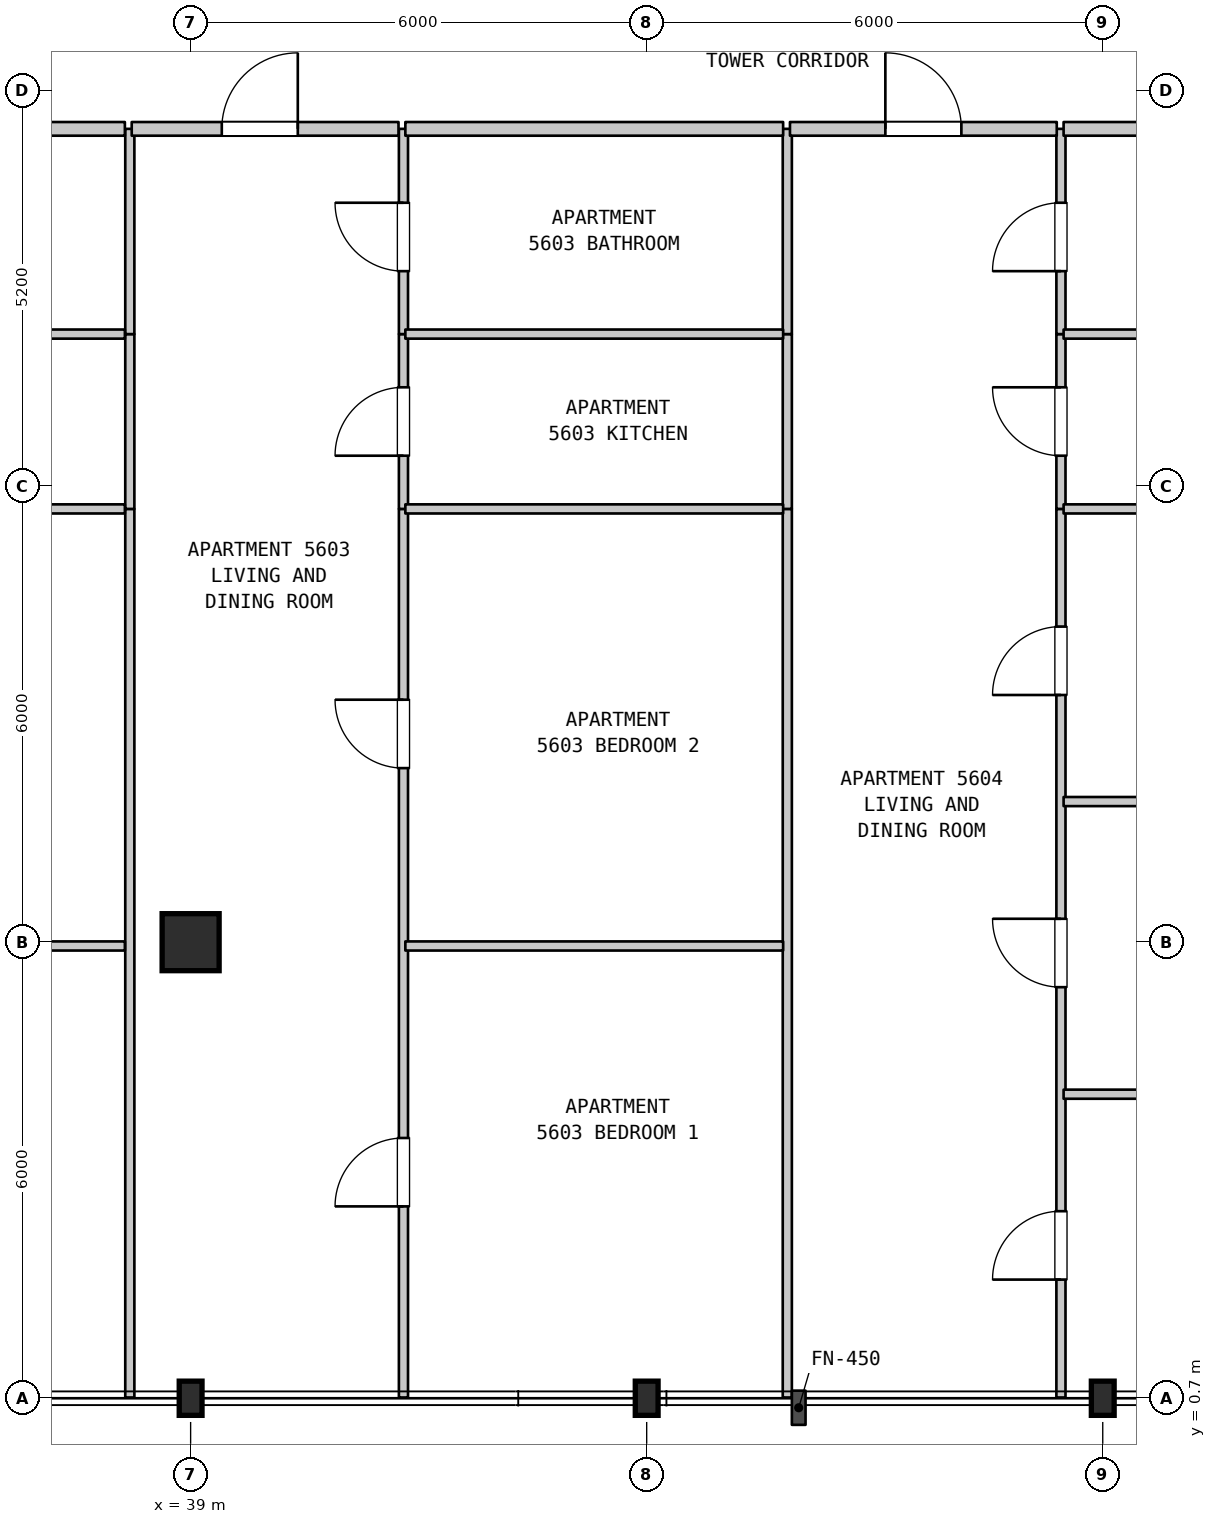
"""IFC4 building model, lengths in metres.
Left out: names, types, materials, properties, quantities, classifications, styles, units other than length and angle.
Written with IfcOpenShell. Run it as: python <this file> out.ifc"""

import sys

from ifc_helpers import new_model, si_unit, direction, frame, frame_2d, origin, origin_2d, place, context, subcontext, project, spatial, rectangle, i_section, extrude, element, fill, save


model = new_model("IFC4")
c1 = context("Model", 3, precision=1e-05, world=origin(), true_north=direction((0.0, 1.0)))
c2 = subcontext(c1, "Body", "Model", "MODEL_VIEW")
j1 = project(units=[si_unit("LENGTHUNIT", "METRE"), si_unit("PLANEANGLEUNIT", "RADIAN")], contexts=[c1])
p1 = place(None, origin())
s1 = spatial("IfcSite", under=j1, at=p1, CompositionType="ELEMENT")
p2 = place(p1, origin())
s2 = spatial("IfcBuilding", under=s1, at=p2, CompositionType="ELEMENT")
p3 = place(p2, frame((0.0, 0.0, 226.5)))
s3 = spatial("IfcBuildingStorey", under=s2, at=p3, CompositionType="ELEMENT", Elevation=226.5)
p4 = place(p3, frame((39.0, 0.7, 0.0), z_axis=(0.0, 0.0, 1.0), x_axis=(1.0, 0.0, 0.0)))
e1 = element("IfcColumn", 1, at=p4, inside=s3, PredefinedType="COLUMN", context=c2, shape_type="SweptSolid", body=[
    extrude(i_section(OverallWidth=0.3, OverallDepth=0.45, WebThickness=0.014, FlangeThickness=0.026, FilletRadius=0.027, at=origin_2d()), origin(), (0.0, 0.0, 1.0), 3.7),
])
p5 = place(p3, frame((39.0, 6.7, 0.0), z_axis=(0.0, 0.0, 1.0), x_axis=(1.0, 0.0, 0.0)))
e2 = element("IfcColumn", 2, at=p5, inside=s3, PredefinedType="COLUMN", context=c2, shape_type="SweptSolid", body=[
    extrude(rectangle(XDim=0.75, YDim=0.75, at=origin_2d()), origin(), (0.0, 0.0, 1.0), 3.7),
])
for number, where, z_axis, x_axis in (
    (3, (45.0, 0.7, 0.0), (0.0, 0.0, 1.0), (1.0, 0.0, 0.0)),
    (4, (51.0, 0.7, 0.0), (0.0, 0.0, 1.0), (1.0, 0.0, 0.0)),
):
    element("IfcColumn", number, at=place(p3, frame(where, z_axis=z_axis, x_axis=x_axis)), inside=s3, PredefinedType="COLUMN", context=c2, shape_type="SweptSolid", body=[
        extrude(i_section(OverallWidth=0.3, OverallDepth=0.45, WebThickness=0.014, FlangeThickness=0.026, FilletRadius=0.027, at=origin_2d()), origin(), (0.0, 0.0, 1.0), 3.7),
    ])
p6 = place(p3, frame((38.2, 0.71, 0.0), z_axis=(0.0, 0.0, 1.0), x_axis=(0.0, 1.0, 0.0)))
e5 = element("IfcWall", 5, at=p6, inside=s3, PredefinedType="PARTITIONING", context=c2, shape_type="SweptSolid", body=[
    extrude(rectangle(XDim=11.69, YDim=0.12, at=frame_2d((5.845, 0.0))), origin(), (0.0, 0.0, 1.0), 3.39),
])
p7 = place(p3, frame((38.2, 12.4, 0.0), z_axis=(0.0, 0.0, 1.0), x_axis=(0.0, 1.0, 0.0)))
e6 = element("IfcWall", 6, at=p7, inside=s3, PredefinedType="PARTITIONING", context=c2, shape_type="SweptSolid", body=[
    extrude(rectangle(XDim=2.3, YDim=0.12, at=frame_2d((1.15, 0.0))), origin(), (0.0, 0.0, 1.0), 3.39),
])
p8 = place(p3, frame((38.2, 14.7, 0.0), z_axis=(0.0, 0.0, 1.0), x_axis=(0.0, 1.0, 0.0)))
e7 = element("IfcWall", 7, at=p8, inside=s3, PredefinedType="PARTITIONING", context=c2, shape_type="SweptSolid", body=[
    extrude(rectangle(XDim=2.7, YDim=0.12, at=frame_2d((1.35, 0.0))), origin(), (0.0, 0.0, 1.0), 3.39),
])
p9 = place(p3, frame((41.8, 0.71, 0.0), z_axis=(0.0, 0.0, 1.0), x_axis=(0.0, 1.0, 0.0)))
e8 = element("IfcWall", 8, at=p9, inside=s3, PredefinedType="PARTITIONING", context=c2, shape_type="SweptSolid", body=[
    extrude(rectangle(XDim=11.69, YDim=0.12, at=frame_2d((5.845, 0.0))), origin(), (0.0, 0.0, 1.0), 3.39),
])
p10 = place(p9, frame((2.514, 0.0, 0.0)))
e9 = element("IfcOpeningElement", 9, at=p10, cuts=e8, PredefinedType="OPENING", context=c2, shape_type="SweptSolid", body=[
    extrude(rectangle(XDim=0.9, YDim=2.15, at=frame_2d((0.45, 1.075))), frame((0.0, 0.07, 0.0), z_axis=(0.0, -1.0, 0.0), x_axis=(1.0, 0.0, 0.0)), (0.0, 0.0, 1.0), 0.14),
])
p11 = place(p9, frame((8.28, 0.0, 0.0)))
e10 = element("IfcOpeningElement", 10, at=p11, cuts=e8, PredefinedType="OPENING", context=c2, shape_type="SweptSolid", body=[
    extrude(rectangle(XDim=0.9, YDim=2.15, at=frame_2d((0.45, 1.075))), frame((0.0, 0.07, 0.0), z_axis=(0.0, -1.0, 0.0), x_axis=(1.0, 0.0, 0.0)), (0.0, 0.0, 1.0), 0.14),
])
p12 = place(p3, frame((41.8, 12.4, 0.0), z_axis=(0.0, 0.0, 1.0), x_axis=(0.0, 1.0, 0.0)))
e11 = element("IfcWall", 11, at=p12, inside=s3, PredefinedType="PARTITIONING", context=c2, shape_type="SweptSolid", body=[
    extrude(rectangle(XDim=2.3, YDim=0.12, at=frame_2d((1.15, 0.0))), origin(), (0.0, 0.0, 1.0), 3.39),
])
p13 = place(p12, frame((0.7, 0.0, 0.0)))
e12 = element("IfcOpeningElement", 12, at=p13, cuts=e11, PredefinedType="OPENING", context=c2, shape_type="SweptSolid", body=[
    extrude(rectangle(XDim=0.9, YDim=2.15, at=frame_2d((0.45, 1.075))), frame((0.0, 0.07, 0.0), z_axis=(0.0, -1.0, 0.0), x_axis=(1.0, 0.0, 0.0)), (0.0, 0.0, 1.0), 0.14),
])
p14 = place(p3, frame((41.8, 14.7, 0.0), z_axis=(0.0, 0.0, 1.0), x_axis=(0.0, 1.0, 0.0)))
e13 = element("IfcWall", 13, at=p14, inside=s3, PredefinedType="PARTITIONING", context=c2, shape_type="SweptSolid", body=[
    extrude(rectangle(XDim=2.7, YDim=0.12, at=frame_2d((1.35, 0.0))), origin(), (0.0, 0.0, 1.0), 3.39),
])
p15 = place(p14, frame((0.828, 0.0, 0.0)))
e14 = element("IfcOpeningElement", 14, at=p15, cuts=e13, PredefinedType="OPENING", context=c2, shape_type="SweptSolid", body=[
    extrude(rectangle(XDim=0.9, YDim=2.1, at=frame_2d((0.45, 1.05))), frame((0.0, 0.07, 0.0), z_axis=(0.0, -1.0, 0.0), x_axis=(1.0, 0.0, 0.0)), (0.0, 0.0, 1.0), 0.14),
])
p16 = place(p3, frame((46.85, 0.71, 0.0), z_axis=(0.0, 0.0, 1.0), x_axis=(0.0, 1.0, 0.0)))
e15 = element("IfcWall", 15, at=p16, inside=s3, PredefinedType="PARTITIONING", context=c2, shape_type="SweptSolid", body=[
    extrude(rectangle(XDim=11.69, YDim=0.12, at=frame_2d((5.845, 0.0))), origin(), (0.0, 0.0, 1.0), 3.39),
])
p17 = place(p3, frame((46.85, 12.4, 0.0), z_axis=(0.0, 0.0, 1.0), x_axis=(0.0, 1.0, 0.0)))
e16 = element("IfcWall", 16, at=p17, inside=s3, PredefinedType="PARTITIONING", context=c2, shape_type="SweptSolid", body=[
    extrude(rectangle(XDim=2.3, YDim=0.12, at=frame_2d((1.15, 0.0))), origin(), (0.0, 0.0, 1.0), 3.39),
])
p18 = place(p3, frame((46.85, 14.7, 0.0), z_axis=(0.0, 0.0, 1.0), x_axis=(0.0, 1.0, 0.0)))
e17 = element("IfcWall", 17, at=p18, inside=s3, PredefinedType="PARTITIONING", context=c2, shape_type="SweptSolid", body=[
    extrude(rectangle(XDim=2.7, YDim=0.12, at=frame_2d((1.35, 0.0))), origin(), (0.0, 0.0, 1.0), 3.39),
])
p19 = place(p3, frame((50.45, 0.71, 0.0), z_axis=(0.0, 0.0, 1.0), x_axis=(0.0, 1.0, 0.0)))
e18 = element("IfcWall", 18, at=p19, inside=s3, PredefinedType="PARTITIONING", context=c2, shape_type="SweptSolid", body=[
    extrude(rectangle(XDim=11.69, YDim=0.12, at=frame_2d((5.845, 0.0))), origin(), (0.0, 0.0, 1.0), 3.39),
])
p20 = place(p19, frame((1.551, 0.0, 0.0)))
e19 = element("IfcOpeningElement", 19, at=p20, cuts=e18, PredefinedType="OPENING", context=c2, shape_type="SweptSolid", body=[
    extrude(rectangle(XDim=0.9, YDim=2.15, at=frame_2d((0.45, 1.075))), frame((0.0, 0.07, 0.0), z_axis=(0.0, -1.0, 0.0), x_axis=(1.0, 0.0, 0.0)), (0.0, 0.0, 1.0), 0.14),
])
p21 = place(p19, frame((5.398, 0.0, 0.0)))
e20 = element("IfcOpeningElement", 20, at=p21, cuts=e18, PredefinedType="OPENING", context=c2, shape_type="SweptSolid", body=[
    extrude(rectangle(XDim=0.9, YDim=2.15, at=frame_2d((0.45, 1.075))), frame((0.0, 0.07, 0.0), z_axis=(0.0, -1.0, 0.0), x_axis=(1.0, 0.0, 0.0)), (0.0, 0.0, 1.0), 0.14),
])
p22 = place(p19, frame((9.242, 0.0, 0.0)))
e21 = element("IfcOpeningElement", 21, at=p22, cuts=e18, PredefinedType="OPENING", context=c2, shape_type="SweptSolid", body=[
    extrude(rectangle(XDim=0.9, YDim=2.15, at=frame_2d((0.45, 1.075))), frame((0.0, 0.07, 0.0), z_axis=(0.0, -1.0, 0.0), x_axis=(1.0, 0.0, 0.0)), (0.0, 0.0, 1.0), 0.14),
])
p23 = place(p3, frame((50.45, 12.4, 0.0), z_axis=(0.0, 0.0, 1.0), x_axis=(0.0, 1.0, 0.0)))
e22 = element("IfcWall", 22, at=p23, inside=s3, PredefinedType="PARTITIONING", context=c2, shape_type="SweptSolid", body=[
    extrude(rectangle(XDim=2.3, YDim=0.12, at=frame_2d((1.15, 0.0))), origin(), (0.0, 0.0, 1.0), 3.39),
])
p24 = place(p23, frame((0.7, 0.0, 0.0)))
e23 = element("IfcOpeningElement", 23, at=p24, cuts=e22, PredefinedType="OPENING", context=c2, shape_type="SweptSolid", body=[
    extrude(rectangle(XDim=0.9, YDim=2.15, at=frame_2d((0.45, 1.075))), frame((0.0, 0.07, 0.0), z_axis=(0.0, -1.0, 0.0), x_axis=(1.0, 0.0, 0.0)), (0.0, 0.0, 1.0), 0.14),
])
p25 = place(p3, frame((50.45, 14.7, 0.0), z_axis=(0.0, 0.0, 1.0), x_axis=(0.0, 1.0, 0.0)))
e24 = element("IfcWall", 24, at=p25, inside=s3, PredefinedType="PARTITIONING", context=c2, shape_type="SweptSolid", body=[
    extrude(rectangle(XDim=2.7, YDim=0.12, at=frame_2d((1.35, 0.0))), origin(), (0.0, 0.0, 1.0), 3.39),
])
p26 = place(p25, frame((0.828, 0.0, 0.0)))
e25 = element("IfcOpeningElement", 25, at=p26, cuts=e24, PredefinedType="OPENING", context=c2, shape_type="SweptSolid", body=[
    extrude(rectangle(XDim=0.9, YDim=2.1, at=frame_2d((0.45, 1.05))), frame((0.0, 0.07, 0.0), z_axis=(0.0, -1.0, 0.0), x_axis=(1.0, 0.0, 0.0)), (0.0, 0.0, 1.0), 0.14),
])
p27 = place(p3, frame((50.485, 4.7, 0.0), z_axis=(0.0, 0.0, 1.0), x_axis=(1.0, 0.0, 0.0)))
e26 = element("IfcWall", 26, at=p27, inside=s3, PredefinedType="PARTITIONING", context=c2, shape_type="SweptSolid", body=[
    extrude(rectangle(XDim=6.505, YDim=0.12, at=frame_2d((3.252, 0.0))), origin(), (0.0, 0.0, 1.0), 3.39),
])
p28 = place(p3, frame((33.445, 6.65, 0.0), z_axis=(0.0, 0.0, 1.0), x_axis=(1.0, 0.0, 0.0)))
e27 = element("IfcWall", 27, at=p28, inside=s3, PredefinedType="PARTITIONING", context=c2, shape_type="SweptSolid", body=[
    extrude(rectangle(XDim=4.69, YDim=0.12, at=frame_2d((2.345, 0.0))), origin(), (0.0, 0.0, 1.0), 3.09),
])
p29 = place(p3, frame((41.825, 6.65, 0.0), z_axis=(0.0, 0.0, 1.0), x_axis=(1.0, 0.0, 0.0)))
e28 = element("IfcWall", 28, at=p29, inside=s3, PredefinedType="PARTITIONING", context=c2, shape_type="SweptSolid", body=[
    extrude(rectangle(XDim=4.97, YDim=0.12, at=frame_2d((2.485, 0.0))), origin(), (0.0, 0.0, 1.0), 2.79),
])
p30 = place(p3, frame((50.485, 8.55, 0.0), z_axis=(0.0, 0.0, 1.0), x_axis=(1.0, 0.0, 0.0)))
e29 = element("IfcWall", 29, at=p30, inside=s3, PredefinedType="PARTITIONING", context=c2, shape_type="SweptSolid", body=[
    extrude(rectangle(XDim=6.505, YDim=0.12, at=frame_2d((3.252, 0.0))), origin(), (0.0, 0.0, 1.0), 3.39),
])
p31 = place(p3, frame((33.445, 12.4, 0.0), z_axis=(0.0, 0.0, 1.0), x_axis=(1.0, 0.0, 0.0)))
e30 = element("IfcWall", 30, at=p31, inside=s3, PredefinedType="PARTITIONING", context=c2, shape_type="SweptSolid", body=[
    extrude(rectangle(XDim=4.69, YDim=0.12, at=frame_2d((2.345, 0.0))), origin(), (0.0, 0.0, 1.0), 3.39),
])
p32 = place(p3, frame((41.825, 12.4, 0.0), z_axis=(0.0, 0.0, 1.0), x_axis=(1.0, 0.0, 0.0)))
e31 = element("IfcWall", 31, at=p32, inside=s3, PredefinedType="PARTITIONING", context=c2, shape_type="SweptSolid", body=[
    extrude(rectangle(XDim=4.97, YDim=0.12, at=frame_2d((2.485, 0.0))), origin(), (0.0, 0.0, 1.0), 3.39),
])
p33 = place(p3, frame((50.485, 12.4, 0.0), z_axis=(0.0, 0.0, 1.0), x_axis=(1.0, 0.0, 0.0)))
e32 = element("IfcWall", 32, at=p33, inside=s3, PredefinedType="PARTITIONING", context=c2, shape_type="SweptSolid", body=[
    extrude(rectangle(XDim=6.505, YDim=0.12, at=frame_2d((3.252, 0.0))), origin(), (0.0, 0.0, 1.0), 3.39),
])
p34 = place(p3, frame((33.445, 14.7, 0.0), z_axis=(0.0, 0.0, 1.0), x_axis=(1.0, 0.0, 0.0)))
e33 = element("IfcWall", 33, at=p34, inside=s3, PredefinedType="PARTITIONING", context=c2, shape_type="SweptSolid", body=[
    extrude(rectangle(XDim=4.69, YDim=0.12, at=frame_2d((2.345, 0.0))), origin(), (0.0, 0.0, 1.0), 3.39),
])
p35 = place(p3, frame((41.825, 14.7, 0.0), z_axis=(0.0, 0.0, 1.0), x_axis=(1.0, 0.0, 0.0)))
e34 = element("IfcWall", 34, at=p35, inside=s3, PredefinedType="PARTITIONING", context=c2, shape_type="SweptSolid", body=[
    extrude(rectangle(XDim=4.97, YDim=0.12, at=frame_2d((2.485, 0.0))), origin(), (0.0, 0.0, 1.0), 3.39),
])
p36 = place(p3, frame((50.485, 14.7, 0.0), z_axis=(0.0, 0.0, 1.0), x_axis=(1.0, 0.0, 0.0)))
e35 = element("IfcWall", 35, at=p36, inside=s3, PredefinedType="PARTITIONING", context=c2, shape_type="SweptSolid", body=[
    extrude(rectangle(XDim=6.505, YDim=0.12, at=frame_2d((3.252, 0.0))), origin(), (0.0, 0.0, 1.0), 3.39),
])
p37 = place(p3, frame((33.445, 17.4, 0.0), z_axis=(0.0, 0.0, 1.0), x_axis=(1.0, 0.0, 0.0)))
e36 = element("IfcWall", 36, at=p37, inside=s3, PredefinedType="STANDARD", context=c2, shape_type="SweptSolid", body=[
    extrude(rectangle(XDim=4.69, YDim=0.18, at=frame_2d((2.345, 0.0))), origin(), (0.0, 0.0, 1.0), 3.39),
])
p38 = place(p3, frame((38.225, 17.4, 0.0), z_axis=(0.0, 0.0, 1.0), x_axis=(1.0, 0.0, 0.0)))
e37 = element("IfcWall", 37, at=p38, inside=s3, PredefinedType="STANDARD", context=c2, shape_type="SweptSolid", body=[
    extrude(rectangle(XDim=3.51, YDim=0.18, at=frame_2d((1.755, 0.0))), origin(), (0.0, 0.0, 1.0), 3.39),
])
p39 = place(p38, frame((1.185, 0.0, 0.0)))
e38 = element("IfcOpeningElement", 38, at=p39, cuts=e37, PredefinedType="OPENING", context=c2, shape_type="SweptSolid", body=[
    extrude(rectangle(XDim=1.0, YDim=2.15, at=frame_2d((0.5, 1.075))), frame((0.0, 0.1, 0.0), z_axis=(0.0, -1.0, 0.0), x_axis=(1.0, 0.0, 0.0)), (0.0, 0.0, 1.0), 0.2),
])
p40 = place(p3, frame((41.825, 17.4, 0.0), z_axis=(0.0, 0.0, 1.0), x_axis=(1.0, 0.0, 0.0)))
e39 = element("IfcWall", 39, at=p40, inside=s3, PredefinedType="STANDARD", context=c2, shape_type="SweptSolid", body=[
    extrude(rectangle(XDim=4.97, YDim=0.18, at=frame_2d((2.485, 0.0))), origin(), (0.0, 0.0, 1.0), 3.39),
])
p41 = place(p3, frame((46.885, 17.4, 0.0), z_axis=(0.0, 0.0, 1.0), x_axis=(1.0, 0.0, 0.0)))
e40 = element("IfcWall", 40, at=p41, inside=s3, PredefinedType="STANDARD", context=c2, shape_type="SweptSolid", body=[
    extrude(rectangle(XDim=3.51, YDim=0.18, at=frame_2d((1.755, 0.0))), origin(), (0.0, 0.0, 1.0), 3.39),
])
p42 = place(p41, frame((1.255, 0.0, 0.0)))
e41 = element("IfcOpeningElement", 41, at=p42, cuts=e40, PredefinedType="OPENING", context=c2, shape_type="SweptSolid", body=[
    extrude(rectangle(XDim=1.0, YDim=2.15, at=frame_2d((0.5, 1.075))), frame((0.0, 0.1, 0.0), z_axis=(0.0, -1.0, 0.0), x_axis=(1.0, 0.0, 0.0)), (0.0, 0.0, 1.0), 0.2),
])
p43 = place(p3, frame((50.485, 17.4, 0.0), z_axis=(0.0, 0.0, 1.0), x_axis=(1.0, 0.0, 0.0)))
e42 = element("IfcWall", 42, at=p43, inside=s3, PredefinedType="STANDARD", context=c2, shape_type="SweptSolid", body=[
    extrude(rectangle(XDim=1.455, YDim=0.18, at=frame_2d((0.728, 0.0))), origin(), (0.0, 0.0, 1.0), 3.39),
])
p44 = place(p10, origin())
e43 = element("IfcDoor", 43, at=p44, inside=s3, OperationType="SINGLE_SWING_LEFT", PredefinedType="DOOR", context=c2, shape_type="SweptSolid", body=[
    extrude(rectangle(XDim=0.9, YDim=2.15, at=frame_2d((0.45, 1.075))), frame((0.0, 0.025, 0.0), z_axis=(0.0, -1.0, 0.0), x_axis=(1.0, 0.0, 0.0)), (0.0, 0.0, 1.0), 0.05),
])
fill(e9, e43)
p45 = place(p11, origin())
e44 = element("IfcDoor", 44, at=p45, inside=s3, OperationType="SINGLE_SWING_RIGHT", PredefinedType="DOOR", context=c2, shape_type="SweptSolid", body=[
    extrude(rectangle(XDim=0.9, YDim=2.15, at=frame_2d((0.45, 1.075))), frame((0.0, 0.025, 0.0), z_axis=(0.0, -1.0, 0.0), x_axis=(1.0, 0.0, 0.0)), (0.0, 0.0, 1.0), 0.05),
])
fill(e10, e44)
p46 = place(p13, origin())
e45 = element("IfcDoor", 45, at=p46, inside=s3, OperationType="SINGLE_SWING_LEFT", PredefinedType="DOOR", context=c2, shape_type="SweptSolid", body=[
    extrude(rectangle(XDim=0.9, YDim=2.15, at=frame_2d((0.45, 1.075))), frame((0.0, 0.025, 0.0), z_axis=(0.0, -1.0, 0.0), x_axis=(1.0, 0.0, 0.0)), (0.0, 0.0, 1.0), 0.05),
])
fill(e12, e45)
p47 = place(p15, origin())
e46 = element("IfcDoor", 46, at=p47, inside=s3, OperationType="SINGLE_SWING_RIGHT", PredefinedType="DOOR", context=c2, shape_type="SweptSolid", body=[
    extrude(rectangle(XDim=0.9, YDim=2.1, at=frame_2d((0.45, 1.05))), frame((0.0, 0.025, 0.0), z_axis=(0.0, -1.0, 0.0), x_axis=(1.0, 0.0, 0.0)), (0.0, 0.0, 1.0), 0.05),
])
fill(e14, e46)
p48 = place(p20, origin())
e47 = element("IfcDoor", 47, at=p48, inside=s3, OperationType="SINGLE_SWING_LEFT", PredefinedType="DOOR", context=c2, shape_type="SweptSolid", body=[
    extrude(rectangle(XDim=0.9, YDim=2.15, at=frame_2d((0.45, 1.075))), frame((0.0, 0.025, 0.0), z_axis=(0.0, -1.0, 0.0), x_axis=(1.0, 0.0, 0.0)), (0.0, 0.0, 1.0), 0.05),
])
fill(e19, e47)
p49 = place(p21, origin())
e48 = element("IfcDoor", 48, at=p49, inside=s3, OperationType="SINGLE_SWING_RIGHT", PredefinedType="DOOR", context=c2, shape_type="SweptSolid", body=[
    extrude(rectangle(XDim=0.9, YDim=2.15, at=frame_2d((0.45, 1.075))), frame((0.0, 0.025, 0.0), z_axis=(0.0, -1.0, 0.0), x_axis=(1.0, 0.0, 0.0)), (0.0, 0.0, 1.0), 0.05),
])
fill(e20, e48)
p50 = place(p22, origin())
e49 = element("IfcDoor", 49, at=p50, inside=s3, OperationType="SINGLE_SWING_LEFT", PredefinedType="DOOR", context=c2, shape_type="SweptSolid", body=[
    extrude(rectangle(XDim=0.9, YDim=2.15, at=frame_2d((0.45, 1.075))), frame((0.0, 0.025, 0.0), z_axis=(0.0, -1.0, 0.0), x_axis=(1.0, 0.0, 0.0)), (0.0, 0.0, 1.0), 0.05),
])
fill(e21, e49)
p51 = place(p24, origin())
e50 = element("IfcDoor", 50, at=p51, inside=s3, OperationType="SINGLE_SWING_RIGHT", PredefinedType="DOOR", context=c2, shape_type="SweptSolid", body=[
    extrude(rectangle(XDim=0.9, YDim=2.15, at=frame_2d((0.45, 1.075))), frame((0.0, 0.025, 0.0), z_axis=(0.0, -1.0, 0.0), x_axis=(1.0, 0.0, 0.0)), (0.0, 0.0, 1.0), 0.05),
])
fill(e23, e50)
p52 = place(p26, origin())
e51 = element("IfcDoor", 51, at=p52, inside=s3, OperationType="SINGLE_SWING_LEFT", PredefinedType="DOOR", context=c2, shape_type="SweptSolid", body=[
    extrude(rectangle(XDim=0.9, YDim=2.1, at=frame_2d((0.45, 1.05))), frame((0.0, 0.025, 0.0), z_axis=(0.0, -1.0, 0.0), x_axis=(1.0, 0.0, 0.0)), (0.0, 0.0, 1.0), 0.05),
])
fill(e25, e51)
p53 = place(p39, origin())
e52 = element("IfcDoor", 52, at=p53, inside=s3, OperationType="SINGLE_SWING_RIGHT", PredefinedType="DOOR", context=c2, shape_type="SweptSolid", body=[
    extrude(rectangle(XDim=1.0, YDim=2.15, at=frame_2d((0.5, 1.075))), frame((0.0, 0.025, 0.0), z_axis=(0.0, -1.0, 0.0), x_axis=(1.0, 0.0, 0.0)), (0.0, 0.0, 1.0), 0.05),
])
fill(e38, e52)
p54 = place(p42, origin())
e53 = element("IfcDoor", 53, at=p54, inside=s3, OperationType="SINGLE_SWING_LEFT", PredefinedType="DOOR", context=c2, shape_type="SweptSolid", body=[
    extrude(rectangle(XDim=1.0, YDim=2.15, at=frame_2d((0.5, 1.075))), frame((0.0, 0.025, 0.0), z_axis=(0.0, -1.0, 0.0), x_axis=(1.0, 0.0, 0.0)), (0.0, 0.0, 1.0), 0.05),
])
fill(e41, e53)
save(model, sys.argv[1])
